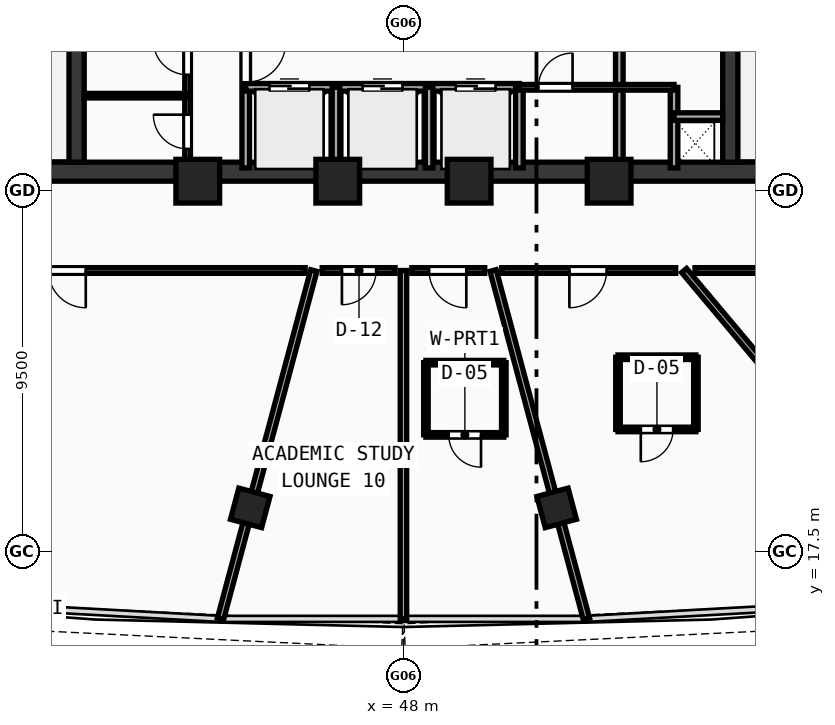
"""IFC4 building model, lengths in metres.
Left out: names, types, materials, properties, quantities, classifications, styles, units other than length and angle.
Written with IfcOpenShell. Run it as: python <this file> out.ifc"""

import sys

from ifc_helpers import new_model, si_unit, direction, frame, frame_2d, origin, origin_with_axes, origin_2d, place, context, subcontext, project, spatial, rectangle, hollow_rectangle, extrude, source, transform, mapped, element, fill, save


model = new_model("IFC4")
c1 = context("Model", 3, precision=1e-05, world=origin(), true_north=direction((0.0, 1.0)))
c2 = subcontext(c1, "Body", "Model", "MODEL_VIEW")
j1 = project(units=[si_unit("LENGTHUNIT", "METRE"), si_unit("PLANEANGLEUNIT", "RADIAN")], contexts=[c1])
p1 = place(None, origin())
s1 = spatial("IfcSite", under=j1, at=p1, CompositionType="ELEMENT")
p2 = place(p1, origin())
s2 = spatial("IfcBuilding", under=s1, at=p2, CompositionType="ELEMENT")
p3 = place(p2, frame((0.0, 0.0, 229.61)))
s3 = spatial("IfcBuildingStorey", under=s2, at=p3, CompositionType="ELEMENT", Elevation=229.61)
p4 = place(p3, frame((35.55, 27.5, 0.0), z_axis=(0.0, 0.0, 1.0), x_axis=(1.0, 0.0, 0.0)))
e1 = element("IfcWall", 1, at=p4, inside=s3, PredefinedType="SHEAR", context=c2, shape_type="SweptSolid", body=[
    extrude(rectangle(XDim=24.9, YDim=0.5, at=frame_2d((12.45, 0.0))), origin(), (0.0, 0.0, 1.0), 3.47),
])
p5 = place(p3, frame((39.4, 27.75, 0.0), z_axis=(0.0, 0.0, 1.0), x_axis=(0.0, 1.0, 0.0)))
e2 = element("IfcWall", 2, at=p5, inside=s3, PredefinedType="SHEAR", context=c2, shape_type="SweptSolid", body=[
    extrude(rectangle(XDim=12.2, YDim=0.4, at=frame_2d((6.1, 0.0))), origin(), (0.0, 0.0, 1.0), 3.47),
])
p6 = place(p5, frame((10.0, 0.0, 0.0)))
e3 = element("IfcOpeningElement", 3, at=p6, cuts=e2, PredefinedType="OPENING", context=c2, shape_type="SweptSolid", body=[
    extrude(rectangle(XDim=1.1, YDim=2.1, at=frame_2d((0.55, 1.05))), frame((0.0, 0.21, 0.0), z_axis=(0.0, -1.0, 0.0), x_axis=(1.0, 0.0, 0.0)), (0.0, 0.0, 1.0), 0.42),
])
p7 = place(p3, frame((56.6, 27.75, 0.0), z_axis=(0.0, 0.0, 1.0), x_axis=(0.0, 1.0, 0.0)))
e4 = element("IfcWall", 4, at=p7, inside=s3, PredefinedType="SHEAR", context=c2, shape_type="SweptSolid", body=[
    extrude(rectangle(XDim=12.2, YDim=0.4, at=frame_2d((6.1, 0.0))), origin(), (0.0, 0.0, 1.0), 3.47),
])
p8 = place(p7, frame((10.0, 0.0, 0.0)))
e5 = element("IfcOpeningElement", 5, at=p8, cuts=e4, PredefinedType="OPENING", context=c2, shape_type="SweptSolid", body=[
    extrude(rectangle(XDim=1.1, YDim=2.1, at=frame_2d((0.55, 1.05))), frame((0.0, 0.21, 0.0), z_axis=(0.0, -1.0, 0.0), x_axis=(1.0, 0.0, 0.0)), (0.0, 0.0, 1.0), 0.42),
])
m1 = source(origin(), c2, "Body", "SweptSolid", [
    extrude(hollow_rectangle(XDim=1.15, YDim=1.15, WallThickness=0.048, at=origin_2d()), origin(), (0.0, 0.0, 1.0), 3.73),
])
for number, where, z_axis, x_axis in (
    (6, (42.588, 27.25, -0.26), (0.0, 0.0, 1.0), (1.0, 0.0, 0.0)),
    (7, (46.272, 27.25, -0.26), (0.0, 0.0, 1.0), (1.0, 0.0, 0.0)),
    (8, (49.729, 27.25, -0.26), (0.0, 0.0, 1.0), (1.0, 0.0, 0.0)),
    (9, (53.412, 27.25, -0.26), (0.0, 0.0, 1.0), (1.0, 0.0, 0.0)),
):
    element("IfcColumn", number, at=place(p3, frame(where, z_axis=z_axis, x_axis=x_axis)), inside=s3, PredefinedType="COLUMN", context=c2, shape_type="MappedRepresentation", body=[
        mapped(m1, transform((0.0, 0.0, 0.0), scale=1.0)),
    ])
m2 = source(origin(), c2, "Body", "SweptSolid", [
    extrude(hollow_rectangle(XDim=0.85, YDim=0.85, WallThickness=0.034, at=origin_2d()), origin(), (0.0, 0.0, 1.0), 3.73),
])
for number, where, z_axis, x_axis in (
    (10, (43.969, 18.654, -0.26), (0.0, 0.0, 1.0), (0.966, -0.259, 0.0)),
    (11, (52.031, 18.654, -0.26), (0.0, 0.0, 1.0), (0.966, 0.259, 0.0)),
):
    element("IfcColumn", number, at=place(p3, frame(where, z_axis=z_axis, x_axis=x_axis)), inside=s3, PredefinedType="COLUMN", context=c2, shape_type="MappedRepresentation", body=[
        mapped(m2, transform((0.0, 0.0, 0.0), scale=1.0)),
    ])
p9 = place(p3, frame((43.85, 27.6, 0.0), z_axis=(0.0, 0.0, 1.0), x_axis=(0.0, 1.0, 0.0)))
e12 = element("IfcWall", 12, at=p9, inside=s3, PredefinedType="SOLIDWALL", context=c2, shape_type="SweptSolid", body=[
    extrude(rectangle(XDim=6.22, YDim=0.2, at=frame_2d((3.11, 0.0))), origin(), (0.0, 0.0, 1.0), 3.47),
])
p10 = place(p9, frame((2.25, 0.0, 0.0)))
e13 = element("IfcOpeningElement", 13, at=p10, cuts=e12, PredefinedType="OPENING", context=c2, shape_type="SweptSolid", body=[
    extrude(rectangle(XDim=1.05, YDim=2.1, at=frame_2d((0.525, 1.05))), frame((0.0, 0.11, 0.0), z_axis=(0.0, -1.0, 0.0), x_axis=(1.0, 0.0, 0.0)), (0.0, 0.0, 1.0), 0.22),
])
p11 = place(p3, frame((53.68, 27.6, 0.0), z_axis=(0.0, 0.0, 1.0), x_axis=(0.0, 1.0, 0.0)))
e14 = element("IfcWall", 14, at=p11, inside=s3, PredefinedType="SOLIDWALL", context=c2, shape_type="SweptSolid", body=[
    extrude(rectangle(XDim=9.05, YDim=0.2, at=frame_2d((4.525, 0.0))), origin(), (0.0, 0.0, 1.0), 3.47),
])
p12 = place(p11, frame((6.9, 0.0, 0.0)))
e15 = element("IfcOpeningElement", 15, at=p12, cuts=e14, PredefinedType="OPENING", context=c2, shape_type="SweptSolid", body=[
    extrude(rectangle(XDim=1.05, YDim=2.1, at=frame_2d((0.525, 1.05))), frame((0.0, 0.11, 0.0), z_axis=(0.0, -1.0, 0.0), x_axis=(1.0, 0.0, 0.0)), (0.0, 0.0, 1.0), 0.22),
])
p13 = place(p3, frame((43.85, 29.72, 0.0), z_axis=(0.0, 0.0, 1.0), x_axis=(1.0, 0.0, 0.0)))
e16 = element("IfcWall", 16, at=p13, inside=s3, PredefinedType="SOLIDWALL", context=c2, shape_type="SweptSolid", body=[
    extrude(rectangle(XDim=7.2, YDim=0.2, at=frame_2d((3.6, 0.0))), origin(), (0.0, 0.0, 1.0), 3.47),
])
p14 = place(p13, frame((0.625, 0.0, 0.0)))
e17 = element("IfcOpeningElement", 17, at=p14, cuts=e16, PredefinedType="OPENING", context=c2, shape_type="SweptSolid", body=[
    extrude(rectangle(XDim=1.05, YDim=2.1, at=frame_2d((0.525, 1.05))), frame((0.0, 0.11, 0.0), z_axis=(0.0, -1.0, 0.0), x_axis=(1.0, 0.0, 0.0)), (0.0, 0.0, 1.0), 0.22),
])
p15 = place(p13, frame((3.075, 0.0, 0.0)))
e18 = element("IfcOpeningElement", 18, at=p15, cuts=e16, PredefinedType="OPENING", context=c2, shape_type="SweptSolid", body=[
    extrude(rectangle(XDim=1.05, YDim=2.1, at=frame_2d((0.525, 1.05))), frame((0.0, 0.11, 0.0), z_axis=(0.0, -1.0, 0.0), x_axis=(1.0, 0.0, 0.0)), (0.0, 0.0, 1.0), 0.22),
])
p16 = place(p13, frame((5.525, 0.0, 0.0)))
e19 = element("IfcOpeningElement", 19, at=p16, cuts=e16, PredefinedType="OPENING", context=c2, shape_type="SweptSolid", body=[
    extrude(rectangle(XDim=1.05, YDim=2.1, at=frame_2d((0.525, 1.05))), frame((0.0, 0.11, 0.0), z_axis=(0.0, -1.0, 0.0), x_axis=(1.0, 0.0, 0.0)), (0.0, 0.0, 1.0), 0.22),
])
for number, where, z_axis, x_axis in (
    (20, (51.05, 27.6, 0.0), (0.0, 0.0, 1.0), (0.0, 1.0, 0.0)),
    (21, (46.225, 27.6, 0.0), (0.0, 0.0, 1.0), (0.0, 1.0, 0.0)),
    (22, (48.675, 27.6, 0.0), (0.0, 0.0, 1.0), (0.0, 1.0, 0.0)),
    (23, (55.12, 27.6, 0.0), (0.0, 0.0, 1.0), (0.0, 1.0, 0.0)),
):
    element("IfcWall", number, at=place(p3, frame(where, z_axis=z_axis, x_axis=x_axis)), inside=s3, PredefinedType="SOLIDWALL", context=c2, shape_type="SweptSolid", body=[
        extrude(rectangle(XDim=2.12, YDim=0.2, at=frame_2d((1.06, 0.0))), origin(), (0.0, 0.0, 1.0), 3.47),
    ])
p17 = place(p3, frame((55.12, 28.95, 0.0), z_axis=(0.0, 0.0, 1.0), x_axis=(1.0, 0.0, 0.0)))
e24 = element("IfcWall", 24, at=p17, inside=s3, PredefinedType="SOLIDWALL", context=c2, shape_type="SweptSolid", body=[
    extrude(rectangle(XDim=1.28, YDim=0.2, at=frame_2d((0.64, 0.0))), origin(), (0.0, 0.0, 1.0), 3.47),
])
p18 = place(p3, frame((42.32, 27.6, 0.0), z_axis=(0.0, 0.0, 1.0), x_axis=(0.0, 1.0, 0.0)))
e25 = element("IfcWall", 25, at=p18, inside=s3, PredefinedType="PARTITIONING", context=c2, shape_type="SweptSolid", body=[
    extrude(rectangle(XDim=5.9, YDim=0.15, at=frame_2d((2.95, 0.0))), origin(), (0.0, 0.0, 1.0), 3.47),
])
p19 = place(p18, frame((0.5, 0.0, 0.0)))
e26 = element("IfcOpeningElement", 26, at=p19, cuts=e25, PredefinedType="OPENING", context=c2, shape_type="SweptSolid", body=[
    extrude(rectangle(XDim=0.9, YDim=2.1, at=frame_2d((0.45, 1.05))), frame((0.0, 0.085, 0.0), z_axis=(0.0, -1.0, 0.0), x_axis=(1.0, 0.0, 0.0)), (0.0, 0.0, 1.0), 0.17),
])
p20 = place(p18, frame((2.45, 0.0, 0.0)))
e27 = element("IfcOpeningElement", 27, at=p20, cuts=e25, PredefinedType="OPENING", context=c2, shape_type="SweptSolid", body=[
    extrude(rectangle(XDim=0.9, YDim=2.1, at=frame_2d((0.45, 1.05))), frame((0.0, 0.085, 0.0), z_axis=(0.0, -1.0, 0.0), x_axis=(1.0, 0.0, 0.0)), (0.0, 0.0, 1.0), 0.17),
])
p21 = place(p18, frame((4.42, 0.0, 0.0)))
e28 = element("IfcOpeningElement", 28, at=p21, cuts=e25, PredefinedType="OPENING", context=c2, shape_type="SweptSolid", body=[
    extrude(rectangle(XDim=0.94, YDim=2.1, at=frame_2d((0.47, 1.05))), frame((0.0, 0.085, 0.0), z_axis=(0.0, -1.0, 0.0), x_axis=(1.0, 0.0, 0.0)), (0.0, 0.0, 1.0), 0.17),
])
p22 = place(p3, frame((51.05, 29.72, 0.0), z_axis=(0.0, 0.0, 1.0), x_axis=(1.0, 0.0, 0.0)))
e29 = element("IfcWall", 29, at=p22, inside=s3, PredefinedType="PARTITIONING", context=c2, shape_type="SweptSolid", body=[
    extrude(rectangle(XDim=4.07, YDim=0.15, at=frame_2d((2.035, 0.0))), origin(), (0.0, 0.0, 1.0), 3.47),
])
p23 = place(p22, frame((0.5, 0.0, 0.0)))
e30 = element("IfcOpeningElement", 30, at=p23, cuts=e29, PredefinedType="OPENING", context=c2, shape_type="SweptSolid", body=[
    extrude(rectangle(XDim=0.9, YDim=2.1, at=frame_2d((0.45, 1.05))), frame((0.0, 0.085, 0.0), z_axis=(0.0, -1.0, 0.0), x_axis=(1.0, 0.0, 0.0)), (0.0, 0.0, 1.0), 0.17),
])
p24 = place(p3, frame((39.6, 29.5, 0.0), z_axis=(0.0, 0.0, 1.0), x_axis=(1.0, 0.0, 0.0)))
e31 = element("IfcWall", 31, at=p24, inside=s3, PredefinedType="PARTITIONING", context=c2, shape_type="SweptSolid", body=[
    extrude(rectangle(XDim=2.72, YDim=0.12, at=frame_2d((1.36, 0.0))), origin(), (0.0, 0.0, 1.0), 3.47),
])
p25 = place(p3, frame((45.642, 24.9, 0.0), z_axis=(0.0, 0.0, 1.0), x_axis=(-0.258832957733, -0.965922098304, 0.0)))
e32 = element("IfcWall", 32, at=p25, inside=s3, PredefinedType="PARTITIONING", context=c2, shape_type="SweptSolid", body=[
    extrude(rectangle(XDim=9.49, YDim=0.17, at=frame_2d((4.745, 0.0))), origin(), (0.0, 0.0, 1.0), 2.82),
])
p26 = place(p3, frame((48.0, 24.9, 0.0), z_axis=(0.0, 0.0, 1.0), x_axis=(0.0, -1.0, 0.0)))
e33 = element("IfcWall", 33, at=p26, inside=s3, PredefinedType="PARTITIONING", context=c2, shape_type="SweptSolid", body=[
    extrude(rectangle(XDim=9.167, YDim=0.17, at=frame_2d((4.583, 0.0))), origin(), (0.0, 0.0, 1.0), 2.82),
])
p27 = place(p3, frame((50.358, 24.9, 0.0), z_axis=(0.0, 0.0, 1.0), x_axis=(0.258832957733, -0.965922098304, 0.0)))
e34 = element("IfcWall", 34, at=p27, inside=s3, PredefinedType="PARTITIONING", context=c2, shape_type="SweptSolid", body=[
    extrude(rectangle(XDim=9.49, YDim=0.17, at=frame_2d((4.745, 0.0))), origin(), (0.0, 0.0, 1.0), 2.82),
])
p28 = place(p3, frame((55.384, 24.9, 0.0), z_axis=(0.0, 0.0, 1.0), x_axis=(0.642803558478, -0.766031060211, 0.0)))
e35 = element("IfcWall", 35, at=p28, inside=s3, PredefinedType="PARTITIONING", context=c2, shape_type="SweptSolid", body=[
    extrude(rectangle(XDim=11.261, YDim=0.17, at=frame_2d((5.631, 0.0))), origin(), (0.0, 0.0, 1.0), 2.82),
])
p29 = place(p3, frame((62.85, 24.9, 0.0), z_axis=(0.0, 0.0, 1.0), x_axis=(-1.0, 0.0, 0.0)))
e36 = element("IfcWall", 36, at=p29, inside=s3, PredefinedType="PARTITIONING", context=c2, shape_type="SweptSolid", body=[
    extrude(rectangle(XDim=7.179, YDim=0.15, at=frame_2d((3.589, 0.0))), origin(), (0.0, 0.0, 1.0), 3.12),
])
p30 = place(p29, frame((3.028, 0.0, 0.0)))
e37 = element("IfcOpeningElement", 37, at=p30, cuts=e36, PredefinedType="OPENING", context=c2, shape_type="SweptSolid", body=[
    extrude(rectangle(XDim=0.98, YDim=2.12, at=frame_2d((0.49, 1.06))), frame((0.0, 0.085, 0.0), z_axis=(0.0, -1.0, 0.0), x_axis=(1.0, 0.0, 0.0)), (0.0, 0.0, 1.0), 0.17),
])
p31 = place(p3, frame((55.164, 24.9, 0.0), z_axis=(0.0, 0.0, 1.0), x_axis=(-1.0, 0.0, 0.0)))
e38 = element("IfcWall", 38, at=p31, inside=s3, PredefinedType="PARTITIONING", context=c2, shape_type="SweptSolid", body=[
    extrude(rectangle(XDim=4.579, YDim=0.15, at=frame_2d((2.289, 0.0))), origin(), (0.0, 0.0, 1.0), 2.82),
])
p32 = place(p31, frame((1.818, 0.0, 0.0)))
e39 = element("IfcOpeningElement", 39, at=p32, cuts=e38, PredefinedType="OPENING", context=c2, shape_type="SweptSolid", body=[
    extrude(rectangle(XDim=0.98, YDim=2.12, at=frame_2d((0.49, 1.06))), frame((0.0, 0.085, 0.0), z_axis=(0.0, -1.0, 0.0), x_axis=(1.0, 0.0, 0.0)), (0.0, 0.0, 1.0), 0.17),
])
p33 = place(p3, frame((50.138, 24.9, 0.0), z_axis=(0.0, 0.0, 1.0), x_axis=(-1.0, 0.0, 0.0)))
e40 = element("IfcWall", 40, at=p33, inside=s3, PredefinedType="PARTITIONING", context=c2, shape_type="SweptSolid", body=[
    extrude(rectangle(XDim=1.918, YDim=0.15, at=frame_2d((0.959, 0.0))), origin(), (0.0, 0.0, 1.0), 3.47),
])
p34 = place(p33, frame((0.484, 0.0, 0.0)))
e41 = element("IfcOpeningElement", 41, at=p34, cuts=e40, PredefinedType="OPENING", context=c2, shape_type="SweptSolid", body=[
    extrude(rectangle(XDim=0.98, YDim=2.12, at=frame_2d((0.49, 1.06))), frame((0.0, 0.085, 0.0), z_axis=(0.0, -1.0, 0.0), x_axis=(1.0, 0.0, 0.0)), (0.0, 0.0, 1.0), 0.17),
])
p35 = place(p3, frame((47.78, 24.9, 0.0), z_axis=(0.0, 0.0, 1.0), x_axis=(-1.0, 0.0, 0.0)))
e42 = element("IfcWall", 42, at=p35, inside=s3, PredefinedType="PARTITIONING", context=c2, shape_type="SweptSolid", body=[
    extrude(rectangle(XDim=1.918, YDim=0.15, at=frame_2d((0.959, 0.0))), origin(), (0.0, 0.0, 1.0), 3.47),
])
p36 = place(p35, frame((0.499, 0.0, 0.0)))
e43 = element("IfcOpeningElement", 43, at=p36, cuts=e42, PredefinedType="OPENING", context=c2, shape_type="SweptSolid", body=[
    extrude(rectangle(XDim=0.9, YDim=2.08, at=frame_2d((0.45, 1.04))), frame((0.0, 0.085, 0.0), z_axis=(0.0, -1.0, 0.0), x_axis=(1.0, 0.0, 0.0)), (0.0, 0.0, 1.0), 0.17),
])
p37 = place(p3, frame((45.414, 24.9, 0.0), z_axis=(0.0, 0.0, 1.0), x_axis=(-1.0, 0.0, 0.0)))
e44 = element("IfcWall", 44, at=p37, inside=s3, PredefinedType="PARTITIONING", context=c2, shape_type="SweptSolid", body=[
    extrude(rectangle(XDim=12.264, YDim=0.15, at=frame_2d((6.132, 0.0))), origin(), (0.0, 0.0, 1.0), 2.82),
])
p38 = place(p37, frame((5.773, 0.0, 0.0)))
e45 = element("IfcOpeningElement", 45, at=p38, cuts=e44, PredefinedType="OPENING", context=c2, shape_type="SweptSolid", body=[
    extrude(rectangle(XDim=0.98, YDim=2.12, at=frame_2d((0.49, 1.06))), frame((0.0, 0.085, 0.0), z_axis=(0.0, -1.0, 0.0), x_axis=(1.0, 0.0, 0.0)), (0.0, 0.0, 1.0), 0.17),
])
p39 = place(p3, frame((48.591, 20.575, 0.0), z_axis=(0.0, 0.0, 1.0), x_axis=(1.0, 0.0, 0.0)))
e46 = element("IfcWall", 46, at=p39, inside=s3, PredefinedType="PARTITIONING", context=c2, shape_type="SweptSolid", body=[
    extrude(rectangle(XDim=2.05, YDim=0.12, at=frame_2d((1.025, 0.0))), origin(), (0.0, 0.0, 1.0), 3.47),
])
p40 = place(p39, frame((0.6, 0.0, 0.0)))
e47 = element("IfcOpeningElement", 47, at=p40, cuts=e46, PredefinedType="OPENING", context=c2, shape_type="SweptSolid", body=[
    extrude(rectangle(XDim=0.85, YDim=2.1, at=frame_2d((0.425, 1.05))), frame((0.0, 0.07, 0.0), z_axis=(0.0, -1.0, 0.0), x_axis=(1.0, 0.0, 0.0)), (0.0, 0.0, 1.0), 0.14),
])
p41 = place(p3, frame((50.641, 20.575, 0.0), z_axis=(0.0, 0.0, 1.0), x_axis=(0.0, 1.0, 0.0)))
e48 = element("IfcWall", 48, at=p41, inside=s3, PredefinedType="PARTITIONING", context=c2, shape_type="SweptSolid", body=[
    extrude(rectangle(XDim=1.9, YDim=0.12, at=frame_2d((0.95, 0.0))), origin(), (0.0, 0.0, 1.0), 3.12),
])
p42 = place(p3, frame((50.641, 22.475, 0.0), z_axis=(0.0, 0.0, 1.0), x_axis=(-1.0, 0.0, 0.0)))
e49 = element("IfcWall", 49, at=p42, inside=s3, PredefinedType="PARTITIONING", context=c2, shape_type="SweptSolid", body=[
    extrude(rectangle(XDim=2.05, YDim=0.12, at=frame_2d((1.025, 0.0))), origin(), (0.0, 0.0, 1.0), 3.47),
])
p43 = place(p3, frame((48.591, 22.475, 0.0), z_axis=(0.0, 0.0, 1.0), x_axis=(0.0, -1.0, 0.0)))
e50 = element("IfcWall", 50, at=p43, inside=s3, PredefinedType="PARTITIONING", context=c2, shape_type="SweptSolid", body=[
    extrude(rectangle(XDim=1.9, YDim=0.12, at=frame_2d((0.95, 0.0))), origin(), (0.0, 0.0, 1.0), 3.12),
])
p44 = place(p3, frame((53.645, 20.718, 0.0), z_axis=(0.0, 0.0, 1.0), x_axis=(1.0, 0.0, 0.0)))
e51 = element("IfcWall", 51, at=p44, inside=s3, PredefinedType="PARTITIONING", context=c2, shape_type="SweptSolid", body=[
    extrude(rectangle(XDim=2.05, YDim=0.12, at=frame_2d((1.025, 0.0))), origin(), (0.0, 0.0, 1.0), 3.47),
])
p45 = place(p44, frame((0.6, 0.0, 0.0)))
e52 = element("IfcOpeningElement", 52, at=p45, cuts=e51, PredefinedType="OPENING", context=c2, shape_type="SweptSolid", body=[
    extrude(rectangle(XDim=0.85, YDim=2.1, at=frame_2d((0.425, 1.05))), frame((0.0, 0.07, 0.0), z_axis=(0.0, -1.0, 0.0), x_axis=(1.0, 0.0, 0.0)), (0.0, 0.0, 1.0), 0.14),
])
p46 = place(p3, frame((55.695, 20.718, 0.0), z_axis=(0.0, 0.0, 1.0), x_axis=(0.0, 1.0, 0.0)))
e53 = element("IfcWall", 53, at=p46, inside=s3, PredefinedType="PARTITIONING", context=c2, shape_type="SweptSolid", body=[
    extrude(rectangle(XDim=1.9, YDim=0.12, at=frame_2d((0.95, 0.0))), origin(), (0.0, 0.0, 1.0), 3.12),
])
p47 = place(p3, frame((55.695, 22.618, 0.0), z_axis=(0.0, 0.0, 1.0), x_axis=(-1.0, 0.0, 0.0)))
e54 = element("IfcWall", 54, at=p47, inside=s3, PredefinedType="PARTITIONING", context=c2, shape_type="SweptSolid", body=[
    extrude(rectangle(XDim=2.05, YDim=0.12, at=frame_2d((1.025, 0.0))), origin(), (0.0, 0.0, 1.0), 3.47),
])
p48 = place(p3, frame((53.645, 22.618, 0.0), z_axis=(0.0, 0.0, 1.0), x_axis=(0.0, -1.0, 0.0)))
e55 = element("IfcWall", 55, at=p48, inside=s3, PredefinedType="PARTITIONING", context=c2, shape_type="SweptSolid", body=[
    extrude(rectangle(XDim=1.9, YDim=0.12, at=frame_2d((0.95, 0.0))), origin(), (0.0, 0.0, 1.0), 3.12),
])
m3 = source(origin(), c2, "Body", "SweptSolid", [
    extrude(rectangle(XDim=1.05, YDim=2.1, at=frame_2d((0.525, 1.05))), frame((0.0, 0.025, 0.0), z_axis=(0.0, -1.0, 0.0), x_axis=(1.0, 0.0, 0.0)), (0.0, 0.0, 1.0), 0.05),
])
p49 = place(p10, frame((1.05, 0.0, 0.0), z_axis=(0.0, 0.0, 1.0), x_axis=(-1.0, 0.0, 0.0)))
e56 = element("IfcDoor", 56, at=p49, inside=s3, OperationType="SINGLE_SWING_LEFT", PredefinedType="DOOR", context=c2, shape_type="MappedRepresentation", body=[
    mapped(m3, transform((0.0, 0.0, 0.0), scale=1.0)),
])
fill(e13, e56)
p50 = place(p14, origin_with_axes())
e57 = element("IfcDoor", 57, at=p50, inside=s3, OperationType="DOUBLE_DOOR_SLIDING", PredefinedType="DOOR", context=c2, shape_type="MappedRepresentation", body=[
    mapped(m3, transform((0.0, 0.0, 0.0), scale=1.0)),
])
fill(e17, e57)
p51 = place(p15, origin_with_axes())
e58 = element("IfcDoor", 58, at=p51, inside=s3, OperationType="DOUBLE_DOOR_SLIDING", PredefinedType="DOOR", context=c2, shape_type="MappedRepresentation", body=[
    mapped(m3, transform((0.0, 0.0, 0.0), scale=1.0)),
])
fill(e18, e58)
p52 = place(p16, origin_with_axes())
e59 = element("IfcDoor", 59, at=p52, inside=s3, OperationType="DOUBLE_DOOR_SLIDING", PredefinedType="DOOR", context=c2, shape_type="MappedRepresentation", body=[
    mapped(m3, transform((0.0, 0.0, 0.0), scale=1.0)),
])
fill(e19, e59)
m4 = source(origin(), c2, "Body", "SweptSolid", [
    extrude(rectangle(XDim=0.9, YDim=2.1, at=frame_2d((0.45, 1.05))), frame((0.0, 0.025, 0.0), z_axis=(0.0, -1.0, 0.0), x_axis=(1.0, 0.0, 0.0)), (0.0, 0.0, 1.0), 0.05),
])
p53 = place(p19, origin_with_axes())
e60 = element("IfcDoor", 60, at=p53, inside=s3, OperationType="SINGLE_SWING_RIGHT", PredefinedType="DOOR", context=c2, shape_type="MappedRepresentation", body=[
    mapped(m4, transform((0.0, 0.0, 0.0), scale=1.0)),
])
fill(e26, e60)
p54 = place(p20, origin_with_axes())
e61 = element("IfcDoor", 61, at=p54, inside=s3, OperationType="SINGLE_SWING_RIGHT", PredefinedType="DOOR", context=c2, shape_type="MappedRepresentation", body=[
    mapped(m4, transform((0.0, 0.0, 0.0), scale=1.0)),
])
fill(e27, e61)
p55 = place(p23, origin_with_axes())
e62 = element("IfcDoor", 62, at=p55, inside=s3, OperationType="SINGLE_SWING_RIGHT", PredefinedType="DOOR", context=c2, shape_type="MappedRepresentation", body=[
    mapped(m4, transform((0.0, 0.0, 0.0), scale=1.0)),
])
fill(e30, e62)
m5 = source(origin(), c2, "Body", "SweptSolid", [
    extrude(rectangle(XDim=0.98, YDim=2.12, at=frame_2d((0.49, 1.06))), frame((0.0, 0.025, 0.0), z_axis=(0.0, -1.0, 0.0), x_axis=(1.0, 0.0, 0.0)), (0.0, 0.0, 1.0), 0.05),
])
p56 = place(p38, origin_with_axes())
e63 = element("IfcDoor", 63, at=p56, inside=s3, OperationType="SINGLE_SWING_LEFT", PredefinedType="DOOR", context=c2, shape_type="MappedRepresentation", body=[
    mapped(m5, transform((0.0, 0.0, 0.0), scale=1.0)),
])
fill(e45, e63)
m6 = source(origin(), c2, "Body", "SweptSolid", [
    extrude(rectangle(XDim=0.9, YDim=2.08, at=frame_2d((0.45, 1.04))), frame((0.0, 0.025, 0.0), z_axis=(0.0, -1.0, 0.0), x_axis=(1.0, 0.0, 0.0)), (0.0, 0.0, 1.0), 0.05),
])
p57 = place(p36, origin_with_axes())
e64 = element("IfcDoor", 64, at=p57, inside=s3, OperationType="SINGLE_SWING_RIGHT", PredefinedType="DOOR", context=c2, shape_type="MappedRepresentation", body=[
    mapped(m6, transform((0.0, 0.0, 0.0), scale=1.0)),
])
fill(e43, e64)
p58 = place(p34, origin_with_axes())
e65 = element("IfcDoor", 65, at=p58, inside=s3, OperationType="SINGLE_SWING_LEFT", PredefinedType="DOOR", context=c2, shape_type="MappedRepresentation", body=[
    mapped(m5, transform((0.0, 0.0, 0.0), scale=1.0)),
])
fill(e41, e65)
m7 = source(origin(), c2, "Body", "SweptSolid", [
    extrude(rectangle(XDim=0.85, YDim=2.1, at=frame_2d((0.425, 1.05))), frame((0.0, 0.025, 0.0), z_axis=(0.0, -1.0, 0.0), x_axis=(1.0, 0.0, 0.0)), (0.0, 0.0, 1.0), 0.05),
])
p59 = place(p40, frame((0.85, 0.0, 0.0), z_axis=(0.0, 0.0, 1.0), x_axis=(-1.0, 0.0, 0.0)))
e66 = element("IfcDoor", 66, at=p59, inside=s3, OperationType="SINGLE_SWING_LEFT", PredefinedType="DOOR", context=c2, shape_type="MappedRepresentation", body=[
    mapped(m7, transform((0.0, 0.0, 0.0), scale=1.0)),
])
fill(e47, e66)
p60 = place(p32, origin_with_axes())
e67 = element("IfcDoor", 67, at=p60, inside=s3, OperationType="SINGLE_SWING_RIGHT", PredefinedType="DOOR", context=c2, shape_type="MappedRepresentation", body=[
    mapped(m5, transform((0.0, 0.0, 0.0), scale=1.0)),
])
fill(e39, e67)
p61 = place(p45, frame((0.85, 0.0, 0.0), z_axis=(0.0, 0.0, 1.0), x_axis=(-1.0, 0.0, 0.0)))
e68 = element("IfcDoor", 68, at=p61, inside=s3, OperationType="SINGLE_SWING_RIGHT", PredefinedType="DOOR", context=c2, shape_type="MappedRepresentation", body=[
    mapped(m7, transform((0.0, 0.0, 0.0), scale=1.0)),
])
fill(e52, e68)
save(model, sys.argv[1])
